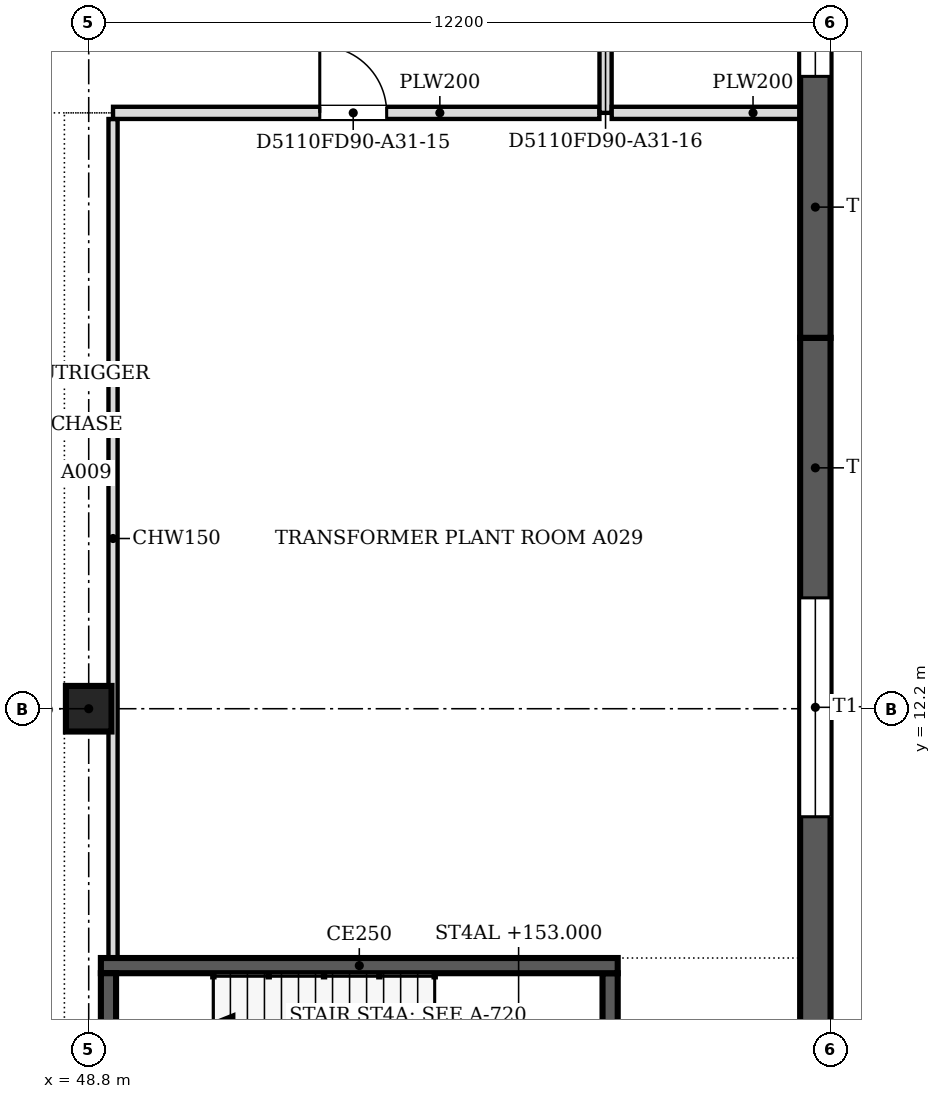
"""IFC4 building model, lengths in metres.
Left out: names, types, materials, properties, quantities, classifications, styles, units other than length and angle.
Written with IfcOpenShell. Run it as: python <this file> out.ifc"""

import sys

from ifc_helpers import new_model, si_unit, direction, frame, frame_2d, origin, origin_2d, place, context, subcontext, project, spatial, polyline, rectangle, outline, extrude, faceted_brep, source, transform, mapped, element, fill, save


model = new_model("IFC4")
c1 = context("Model", 3, precision=1e-05, world=origin(), true_north=direction((0.0, 1.0)))
c2 = subcontext(c1, "Body", "Model", "MODEL_VIEW")
j1 = project(units=[si_unit("LENGTHUNIT", "METRE"), si_unit("PLANEANGLEUNIT", "RADIAN")], contexts=[c1])
p1 = place(None, origin())
s1 = spatial("IfcSite", under=j1, at=p1, CompositionType="ELEMENT")
p2 = place(p1, origin())
s2 = spatial("IfcBuilding", under=s1, at=p2, CompositionType="ELEMENT")
p3 = place(p2, frame((0.0, 0.0, 150.6)))
s3 = spatial("IfcBuildingStorey", under=s2, at=p3, CompositionType="ELEMENT", Elevation=150.6)
p4 = place(p3, frame((48.8, 12.2, 0.0), z_axis=(0.0, 0.0, 1.0), x_axis=(1.0, 0.0, 0.0)))
e1 = element("IfcColumn", 1, at=p4, inside=s3, PredefinedType="COLUMN", context=c2, shape_type="SweptSolid", body=[
    extrude(rectangle(XDim=0.75, YDim=0.75, at=origin_2d()), origin(), (0.0, 0.0, 1.0), 4.6),
])
m1 = source(origin(), c2, "Body", "Brep", [
    faceted_brep([(0.0, -0.25, 0.0), (12.154, -0.25, 0.0), (12.154, -0.25, 4.8), (0.0, -0.25, 4.8), (0.047, 0.25, 4.8), (12.154, 0.25, 4.8), (12.154, 0.25, 0.0), (0.047, 0.25, 0.0), (0.0, 0.0, 0.0), (0.0, 0.0, 4.8)], [[[0, 1, 2, 3]], [[4, 5, 6, 7]], [[7, 6, 1, 0, 8]], [[5, 4, 9, 3, 2]], [[8, 0, 3, 9]], [[7, 8, 9, 4]], [[1, 6, 5, 2]]]),
])
p5 = place(p3, frame((60.75, 6.146, 0.0), z_axis=(0.0, 0.0, 1.0), x_axis=(0.0, 1.0, 0.0)))
e2 = element("IfcWall", 2, at=p5, inside=s3, PredefinedType="SOLIDWALL", context=c2, shape_type="MappedRepresentation", body=[
    mapped(m1, transform((0.0, 0.0, 0.0), scale=1.0)),
])
m2 = source(origin(), c2, "Body", "SweptSolid", [
    extrude(outline(polyline([(4.277, 0.8), (7.877, 0.8), (7.877, 4.0), (4.277, 4.0), (4.277, 0.8)])), frame((0.0, 0.26, 0.0), z_axis=(0.0, -1.0, 0.0), x_axis=(1.0, 0.0, 0.0)), (0.0, 0.0, 1.0), 0.52),
])
p6 = place(p5, origin())
e3 = element("IfcOpeningElement", 3, at=p6, cuts=e2, PredefinedType="OPENING", context=c2, shape_type="MappedRepresentation", body=[
    mapped(m2, transform((0.0, 0.0, 0.0), scale=1.0)),
])
m3 = source(origin(), c2, "Body", "SweptSolid", [
    extrude(outline(polyline([(0.0, 0.0), (12.2, 0.0), (12.2, 4.8), (0.0, 4.8), (0.0, 0.0)])), frame((0.0, 0.25, 0.0), z_axis=(0.0, -1.0, 0.0), x_axis=(1.0, 0.0, 0.0)), (0.0, 0.0, 1.0), 0.5),
])
p7 = place(p3, frame((60.75, 18.3, 0.0), z_axis=(0.0, 0.0, 1.0), x_axis=(0.0, 1.0, 0.0)))
e4 = element("IfcWall", 4, at=p7, inside=s3, PredefinedType="SOLIDWALL", context=c2, shape_type="MappedRepresentation", body=[
    mapped(m3, transform((0.0, 0.0, 0.0), scale=1.0)),
])
m4 = source(origin(), c2, "Body", "SweptSolid", [
    extrude(outline(polyline([(4.3, 0.8), (7.9, 0.8), (7.9, 4.0), (4.3, 4.0), (4.3, 0.8)])), frame((0.0, 0.26, 0.0), z_axis=(0.0, -1.0, 0.0), x_axis=(1.0, 0.0, 0.0)), (0.0, 0.0, 1.0), 0.52),
])
p8 = place(p7, origin())
e5 = element("IfcOpeningElement", 5, at=p8, cuts=e4, PredefinedType="OPENING", context=c2, shape_type="MappedRepresentation", body=[
    mapped(m4, transform((0.0, 0.0, 0.0), scale=1.0)),
])
p9 = place(p3, frame((49.125, 4.45, 0.0), z_axis=(0.0, 0.0, 1.0), x_axis=(0.0, 1.0, 0.0)))
e6 = element("IfcWall", 6, at=p9, inside=s3, PredefinedType="SOLIDWALL", context=c2, shape_type="SweptSolid", body=[
    extrude(rectangle(XDim=3.4, YDim=0.25, at=frame_2d((1.7, 0.0))), origin(), (0.0, 0.0, 1.0), 4.8),
])
p10 = place(p3, frame((49.0, 7.975, 0.0), z_axis=(0.0, 0.0, 1.0), x_axis=(1.0, 0.0, 0.0)))
e7 = element("IfcWall", 7, at=p10, inside=s3, PredefinedType="SOLIDWALL", context=c2, shape_type="SweptSolid", body=[
    extrude(rectangle(XDim=8.5, YDim=0.25, at=frame_2d((4.25, 0.0))), origin(), (0.0, 0.0, 1.0), 4.8),
])
p11 = place(p3, frame((57.375, 7.85, 0.0), z_axis=(0.0, 0.0, 1.0), x_axis=(0.0, -1.0, 0.0)))
e8 = element("IfcWall", 8, at=p11, inside=s3, PredefinedType="SOLIDWALL", context=c2, shape_type="SweptSolid", body=[
    extrude(rectangle(XDim=3.4, YDim=0.25, at=frame_2d((1.7, 0.0))), origin(), (0.0, 0.0, 1.0), 4.8),
])
p12 = place(p3, frame((49.2, 8.1, 0.0), z_axis=(0.0, 0.0, 1.0), x_axis=(0.0, 1.0, 0.0)))
e9 = element("IfcWall", 9, at=p12, inside=s3, PredefinedType="PARTITIONING", context=c2, shape_type="SweptSolid", body=[
    extrude(rectangle(XDim=13.799, YDim=0.15, at=frame_2d((6.899, 0.0))), origin(), (0.0, 0.0, 1.0), 4.067),
])
p13 = place(p3, frame((57.199, 22.0, 0.0), z_axis=(0.0, 0.0, 1.0), x_axis=(-1.0, 0.0, 0.0)))
e10 = element("IfcWall", 10, at=p13, inside=s3, PredefinedType="PARTITIONING", context=c2, shape_type="SweptSolid", body=[
    extrude(rectangle(XDim=7.999, YDim=0.2, at=frame_2d((4.0, 0.0))), origin(), (0.0, 0.0, 1.0), 4.067),
])
m5 = source(origin(), c2, "Body", "SweptSolid", [
    extrude(rectangle(XDim=1.1, YDim=2.1, at=frame_2d((0.55, 1.05))), frame((0.0, 0.11, 0.0), z_axis=(0.0, -1.0, 0.0), x_axis=(1.0, 0.0, 0.0)), (0.0, 0.0, 1.0), 0.22),
])
p14 = place(p13, frame((3.499, 0.0, 0.0)))
e11 = element("IfcOpeningElement", 11, at=p14, cuts=e10, PredefinedType="OPENING", context=c2, shape_type="MappedRepresentation", body=[
    mapped(m5, transform((0.0, 0.0, 0.0), scale=1.0)),
])
p15 = place(p3, frame((57.3, 30.6, 0.0), z_axis=(0.0, 0.0, 1.0), x_axis=(0.0, -1.0, 0.0)))
e12 = element("IfcWall", 12, at=p15, inside=s3, PredefinedType="PARTITIONING", context=c2, shape_type="SweptSolid", body=[
    extrude(rectangle(XDim=8.6, YDim=0.2, at=frame_2d((4.3, 0.0))), origin(), (0.0, 0.0, 1.0), 4.067),
])
p16 = place(p15, frame((3.8, 0.0, 0.0)))
e13 = element("IfcOpeningElement", 13, at=p16, cuts=e12, PredefinedType="OPENING", context=c2, shape_type="MappedRepresentation", body=[
    mapped(m5, transform((0.0, 0.0, 0.0), scale=1.0)),
])
p17 = place(p3, frame((57.401, 22.0, 0.0), z_axis=(0.0, 0.0, 1.0), x_axis=(1.0, 0.0, 0.0)))
e14 = element("IfcWall", 14, at=p17, inside=s3, PredefinedType="PARTITIONING", context=c2, shape_type="SweptSolid", body=[
    extrude(rectangle(XDim=3.099, YDim=0.2, at=frame_2d((1.55, 0.0))), origin(), (0.0, 0.0, 1.0), 4.067),
])
m6 = source(origin(), c2, "Body", "SweptSolid", [
    extrude(outline(polyline([(4.277, 0.8), (7.877, 0.8), (7.877, 4.0), (4.277, 4.0), (4.277, 0.8)])), frame((0.0, 0.03, 0.0), z_axis=(0.0, -1.0, 0.0), x_axis=(1.0, 0.0, 0.0)), (0.0, 0.0, 1.0), 0.06),
])
p18 = place(p6, origin())
e15 = element("IfcWindow", 15, at=p18, inside=s3, PartitioningType="USERDEFINED", PredefinedType="WINDOW", context=c2, shape_type="MappedRepresentation", body=[
    mapped(m6, transform((0.0, 0.0, 0.0), scale=1.0)),
])
fill(e3, e15)
m7 = source(origin(), c2, "Body", "SweptSolid", [
    extrude(outline(polyline([(4.3, 0.8), (7.9, 0.8), (7.9, 4.0), (4.3, 4.0), (4.3, 0.8)])), frame((0.0, 0.03, 0.0), z_axis=(0.0, -1.0, 0.0), x_axis=(1.0, 0.0, 0.0)), (0.0, 0.0, 1.0), 0.06),
])
p19 = place(p8, origin())
e16 = element("IfcWindow", 16, at=p19, inside=s3, PartitioningType="USERDEFINED", PredefinedType="WINDOW", context=c2, shape_type="MappedRepresentation", body=[
    mapped(m7, transform((0.0, 0.0, 0.0), scale=1.0)),
])
fill(e5, e16)
m8 = source(origin(), c2, "Body", "SweptSolid", [
    extrude(rectangle(XDim=1.1, YDim=2.1, at=frame_2d((0.55, 1.05))), frame((0.0, 0.025, 0.0), z_axis=(0.0, -1.0, 0.0), x_axis=(1.0, 0.0, 0.0)), (0.0, 0.0, 1.0), 0.05),
])
p20 = place(p14, origin())
e17 = element("IfcDoor", 17, at=p20, inside=s3, OperationType="SINGLE_SWING_RIGHT", PredefinedType="DOOR", context=c2, shape_type="MappedRepresentation", body=[
    mapped(m8, transform((0.0, 0.0, 0.0), scale=1.0)),
])
fill(e11, e17)
save(model, sys.argv[1])
